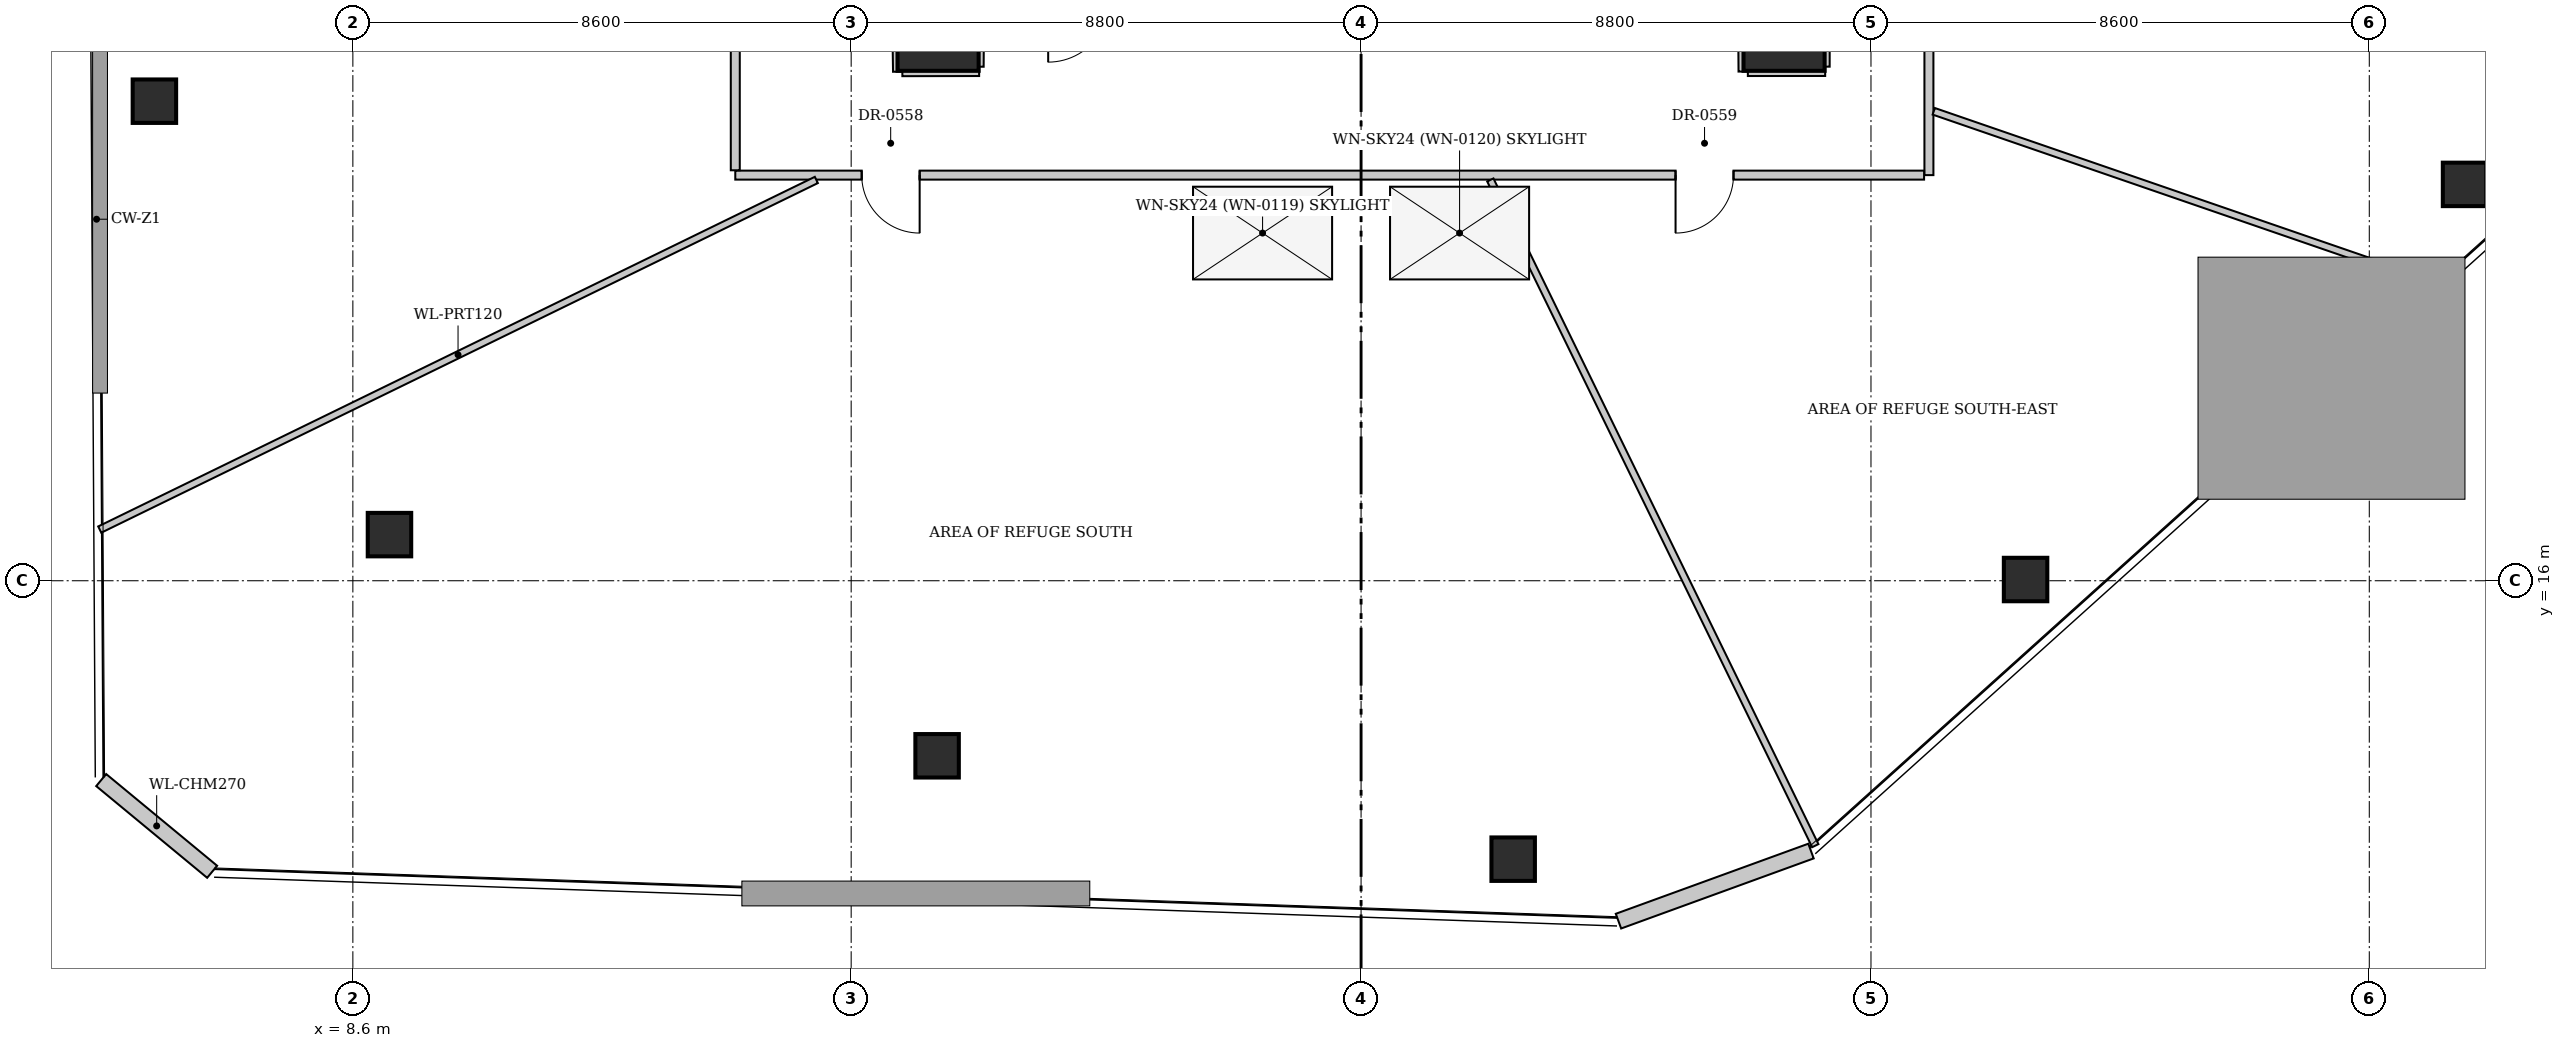
"""IFC4 building model, lengths in metres.
Left out: names, types, materials, properties, quantities, classifications, styles, units other than length and angle.
Written with IfcOpenShell. Run it as: python <this file> out.ifc"""

import sys

from ifc_helpers import new_model, si_unit, direction, frame, frame_2d, origin, origin_2d, place, context, subcontext, project, spatial, rectangle, hollow_rectangle, extrude, source, transform, mapped, element, fill, save


model = new_model("IFC4")
c1 = context("Model", 3, precision=1e-05, world=origin(), true_north=direction((0.0, 1.0)))
c2 = subcontext(c1, "Body", "Model", "MODEL_VIEW")
j1 = project(units=[si_unit("LENGTHUNIT", "METRE"), si_unit("PLANEANGLEUNIT", "RADIAN")], contexts=[c1])
p1 = place(None, origin())
s1 = spatial("IfcSite", under=j1, at=p1, CompositionType="ELEMENT")
p2 = place(p1, origin())
s2 = spatial("IfcBuilding", under=s1, at=p2, CompositionType="ELEMENT")
p3 = place(p2, frame((0.0, 0.0, 84.8)))
s3 = spatial("IfcBuildingStorey", under=s2, at=p3, CompositionType="ELEMENT", Elevation=84.8)
for number, where, z_axis, x_axis in (
    (1, (45.044, 22.84, 0.0), (0.0, 0.0, 1.0), (1.0, 0.0, 0.0)),
    (2, (37.468, 16.021, 0.0), (0.0, 0.0, 1.0), (1.0, 0.0, 0.0)),
    (3, (28.625, 11.195, 0.0), (0.0, 0.0, 1.0), (1.0, 0.0, 0.0)),
    (4, (18.683, 12.979, 0.0), (0.0, 0.0, 1.0), (1.0, 0.0, 0.0)),
    (5, (9.232, 16.796, 0.0), (0.0, 0.0, 1.0), (1.0, 0.0, 0.0)),
    (6, (5.175, 24.276, 0.0), (0.0, 0.0, 1.0), (1.0, 0.0, 0.0)),
):
    element("IfcColumn", number, at=place(p3, frame(where, z_axis=z_axis, x_axis=x_axis)), inside=s3, PredefinedType="COLUMN", context=c2, shape_type="SweptSolid", body=[
        extrude(hollow_rectangle(XDim=0.75, YDim=0.75, WallThickness=0.04, at=origin_2d()), origin(), (0.0, 0.0, 1.0), 4.15),
    ])
for number, where, z_axis, x_axis in (
    (7, (18.7, 25.5, 0.0), (0.0, 0.0, 1.0), (1.0, 0.0, 0.0)),
    (8, (33.3, 25.5, 0.0), (0.0, 0.0, 1.0), (1.0, 0.0, 0.0)),
):
    element("IfcColumn", number, at=place(p3, frame(where, z_axis=z_axis, x_axis=x_axis)), inside=s3, PredefinedType="COLUMN", context=c2, shape_type="SweptSolid", body=[
        extrude(rectangle(XDim=1.4, YDim=1.4, at=origin_2d()), origin(), (0.0, 0.0, 1.0), 4.15),
    ])
p4 = place(p3, frame((6.171, 10.978, 0.0), z_axis=(0.0, 0.0, 1.0), x_axis=(-0.770777069691, 0.637104943348, 0.0)))
e9 = element("IfcWall", 9, at=p4, inside=s3, PredefinedType="SOLIDWALL", context=c2, shape_type="SweptSolid", body=[
    extrude(rectangle(XDim=2.484, YDim=0.27, at=frame_2d((1.242, 0.0))), origin(), (0.0, 0.0, 1.0), 4.15),
])
p5 = place(p3, frame((33.765, 11.335, 0.0), z_axis=(0.0, 0.0, 1.0), x_axis=(-0.939676440204, -0.342064595839, 0.0)))
e10 = element("IfcWall", 10, at=p5, inside=s3, PredefinedType="SOLIDWALL", context=c2, shape_type="SweptSolid", body=[
    extrude(rectangle(XDim=3.536, YDim=0.27, at=frame_2d((1.768, 0.0))), origin(), (0.0, 0.0, 1.0), 4.15),
])
p6 = place(p3, frame((35.8, 41.267, 0.0), z_axis=(0.0, 0.0, 1.0), x_axis=(0.0, -1.0, 0.0)))
e11 = element("IfcWall", 11, at=p6, inside=s3, PredefinedType="PARTITIONING", context=c2, shape_type="SweptSolid", body=[
    extrude(rectangle(XDim=18.267, YDim=0.155, at=frame_2d((9.133, 0.0))), origin(), (0.0, 0.0, 1.0), 4.15),
])
p7 = place(p6, frame((12.56, 0.0, 0.0)))
e12 = element("IfcOpeningElement", 12, at=p7, cuts=e11, PredefinedType="OPENING", context=c2, shape_type="SweptSolid", body=[
    extrude(rectangle(XDim=1.0, YDim=2.15, at=frame_2d((0.5, 1.075))), frame((0.0, 0.087, 0.0), z_axis=(0.0, -1.0, 0.0), x_axis=(1.0, 0.0, 0.0)), (0.0, 0.0, 1.0), 0.175),
])
p8 = place(p6, frame((4.021, 0.0, 0.0)))
e13 = element("IfcOpeningElement", 13, at=p8, cuts=e11, PredefinedType="OPENING", context=c2, shape_type="SweptSolid", body=[
    extrude(rectangle(XDim=1.0, YDim=2.15, at=frame_2d((0.5, 1.075))), frame((0.0, 0.087, 0.0), z_axis=(0.0, -1.0, 0.0), x_axis=(1.0, 0.0, 0.0)), (0.0, 0.0, 1.0), 0.175),
])
p9 = place(p3, frame((35.717, 23.0, 0.0), z_axis=(0.0, 0.0, 1.0), x_axis=(-1.0, 0.0, 0.0)))
e14 = element("IfcWall", 14, at=p9, inside=s3, PredefinedType="PARTITIONING", context=c2, shape_type="SweptSolid", body=[
    extrude(rectangle(XDim=20.517, YDim=0.155, at=frame_2d((10.258, 0.0))), origin(), (0.0, 0.0, 1.0), 4.15),
])
p10 = place(p9, frame((17.335, 0.0, 0.0)))
e15 = element("IfcOpeningElement", 15, at=p10, cuts=e14, PredefinedType="OPENING", context=c2, shape_type="SweptSolid", body=[
    extrude(rectangle(XDim=1.0, YDim=2.15, at=frame_2d((0.5, 1.075))), frame((0.0, 0.087, 0.0), z_axis=(0.0, -1.0, 0.0), x_axis=(1.0, 0.0, 0.0)), (0.0, 0.0, 1.0), 0.175),
])
p11 = place(p9, frame((3.289, 0.0, 0.0)))
e16 = element("IfcOpeningElement", 16, at=p11, cuts=e14, PredefinedType="OPENING", context=c2, shape_type="SweptSolid", body=[
    extrude(rectangle(XDim=1.0, YDim=2.15, at=frame_2d((0.5, 1.075))), frame((0.0, 0.087, 0.0), z_axis=(0.0, -1.0, 0.0), x_axis=(1.0, 0.0, 0.0)), (0.0, 0.0, 1.0), 0.175),
])
p12 = place(p3, frame((15.2, 23.083, 0.0), z_axis=(0.0, 0.0, 1.0), x_axis=(0.0, 1.0, 0.0)))
e17 = element("IfcWall", 17, at=p12, inside=s3, PredefinedType="PARTITIONING", context=c2, shape_type="SweptSolid", body=[
    extrude(rectangle(XDim=18.183, YDim=0.155, at=frame_2d((9.092, 0.0))), origin(), (0.0, 0.0, 1.0), 4.15),
])
p13 = place(p12, frame((3.6, 0.0, 0.0)))
e18 = element("IfcOpeningElement", 18, at=p13, cuts=e17, PredefinedType="OPENING", context=c2, shape_type="SweptSolid", body=[
    extrude(rectangle(XDim=1.0, YDim=2.15, at=frame_2d((0.5, 1.075))), frame((0.0, 0.087, 0.0), z_axis=(0.0, -1.0, 0.0), x_axis=(1.0, 0.0, 0.0)), (0.0, 0.0, 1.0), 0.175),
])
p14 = place(p12, frame((12.631, 0.0, 0.0)))
e19 = element("IfcOpeningElement", 19, at=p14, cuts=e17, PredefinedType="OPENING", context=c2, shape_type="SweptSolid", body=[
    extrude(rectangle(XDim=1.0, YDim=2.15, at=frame_2d((0.5, 1.075))), frame((0.0, 0.087, 0.0), z_axis=(0.0, -1.0, 0.0), x_axis=(1.0, 0.0, 0.0)), (0.0, 0.0, 1.0), 0.175),
])
p15 = place(p3, frame((17.986, 25.717, 0.0), z_axis=(0.0, 0.0, 1.0), x_axis=(0.014935440835, -0.999888460083, 0.0)))
e20 = element("IfcWall", 20, at=p15, inside=s3, PredefinedType="PARTITIONING", context=c2, shape_type="SweptSolid", body=[
    extrude(rectangle(XDim=0.932, YDim=0.155, at=frame_2d((0.466, 0.0))), origin(), (0.0, 0.0, 1.0), 4.15),
])
p16 = place(p3, frame((18.083, 24.785, 0.0), z_axis=(0.0, 0.0, 1.0), x_axis=(0.99999830172, 0.001842975123, 0.0)))
e21 = element("IfcWall", 21, at=p16, inside=s3, PredefinedType="PARTITIONING", context=c2, shape_type="SweptSolid", body=[
    extrude(rectangle(XDim=1.325, YDim=0.155, at=frame_2d((0.662, 0.0))), origin(), (0.0, 0.0, 1.0), 4.15),
])
p17 = place(p3, frame((19.409, 24.871, 0.0), z_axis=(0.0, 0.0, 1.0), x_axis=(0.007106130977, 0.999974751133, 0.0)))
e22 = element("IfcWall", 22, at=p17, inside=s3, PredefinedType="PARTITIONING", context=c2, shape_type="SweptSolid", body=[
    extrude(rectangle(XDim=0.859, YDim=0.155, at=frame_2d((0.429, 0.0))), origin(), (0.0, 0.0, 1.0), 2.725),
])
p18 = place(p3, frame((32.585, 25.73, 0.0), z_axis=(0.0, 0.0, 1.0), x_axis=(0.007253695172, -0.999973691607, 0.0)))
e23 = element("IfcWall", 23, at=p18, inside=s3, PredefinedType="PARTITIONING", context=c2, shape_type="SweptSolid", body=[
    extrude(rectangle(XDim=0.942, YDim=0.155, at=frame_2d((0.471, 0.0))), origin(), (0.0, 0.0, 1.0), 2.725),
])
p19 = place(p3, frame((32.675, 24.788, 0.0), z_axis=(0.0, 0.0, 1.0), x_axis=(0.999999849328, 0.000548947767, 0.0)))
e24 = element("IfcWall", 24, at=p19, inside=s3, PredefinedType="PARTITIONING", context=c2, shape_type="SweptSolid", body=[
    extrude(rectangle(XDim=1.334, YDim=0.155, at=frame_2d((0.667, 0.0))), origin(), (0.0, 0.0, 1.0), 4.15),
])
p20 = place(p3, frame((34.01, 24.872, 0.0), z_axis=(0.0, 0.0, 1.0), x_axis=(0.001642633301, 0.999998650877, 0.0)))
e25 = element("IfcWall", 25, at=p20, inside=s3, PredefinedType="PARTITIONING", context=c2, shape_type="SweptSolid", body=[
    extrude(rectangle(XDim=1.338, YDim=0.155, at=frame_2d((0.669, 0.0))), origin(), (0.0, 0.0, 1.0), 2.725),
])
p21 = place(p3, frame((16.599, 22.917, 0.0), z_axis=(0.0, 0.0, 1.0), x_axis=(-0.898749176451, -0.438463131665, 0.0)))
e26 = element("IfcWall", 26, at=p21, inside=s3, PredefinedType="PARTITIONING", context=c2, shape_type="SweptSolid", body=[
    extrude(rectangle(XDim=13.76, YDim=0.12, at=frame_2d((6.88, 0.0))), origin(), (0.0, 0.0, 1.0), 2.725),
])
p22 = place(p3, frame((28.231, 22.917, 0.0), z_axis=(0.0, 0.0, 1.0), x_axis=(0.438691499882, -0.898637728972, 0.0)))
e27 = element("IfcWall", 27, at=p22, inside=s3, PredefinedType="PARTITIONING", context=c2, shape_type="SweptSolid", body=[
    extrude(rectangle(XDim=12.784, YDim=0.12, at=frame_2d((6.392, 0.0))), origin(), (0.0, 0.0, 1.0), 4.15),
])
p23 = place(p3, frame((35.884, 24.101, 0.0), z_axis=(0.0, 0.0, 1.0), x_axis=(0.945437205547, -0.325804374383, 0.0)))
e28 = element("IfcWall", 28, at=p23, inside=s3, PredefinedType="PARTITIONING", context=c2, shape_type="SweptSolid", body=[
    extrude(rectangle(XDim=9.208, YDim=0.12, at=frame_2d((4.604, 0.0))), origin(), (0.0, 0.0, 1.0), 4.15),
])
p24 = place(p3, frame((0.0, 0.0, -0.35)))
p25 = place(p24, frame((24.3, 22.0, 0.3)))
e29 = element("IfcWindow", 29, at=p25, inside=s3, PartitioningType="SINGLE_PANEL", PredefinedType="SKYLIGHT", context=c2, shape_type="SweptSolid", body=[
    extrude(rectangle(XDim=2.4, YDim=1.6, at=origin_2d()), origin(), (0.0, 0.0, 1.0), 0.05),
])
p26 = place(p24, frame((27.7, 22.0, 0.3)))
e30 = element("IfcWindow", 30, at=p26, inside=s3, PartitioningType="SINGLE_PANEL", PredefinedType="SKYLIGHT", context=c2, shape_type="SweptSolid", body=[
    extrude(rectangle(XDim=2.4, YDim=1.6, at=origin_2d()), origin(), (0.0, 0.0, 1.0), 0.05),
])
m1 = source(origin(), c2, "Body", "SweptSolid", [
    extrude(rectangle(XDim=1.0, YDim=2.15, at=frame_2d((0.5, 1.075))), frame((0.0, 0.025, 0.0), z_axis=(0.0, -1.0, 0.0), x_axis=(1.0, 0.0, 0.0)), (0.0, 0.0, 1.0), 0.05),
])
p27 = place(p10, origin())
e31 = element("IfcDoor", 31, at=p27, inside=s3, OperationType="SINGLE_SWING_LEFT", PredefinedType="DOOR", context=c2, shape_type="MappedRepresentation", body=[
    mapped(m1, transform((0.0, 0.0, 0.0), x_axis=(1.0, 0.0, 0.0), y_axis=(0.0, 1.0, 0.0), z_axis=(0.0, 0.0, 1.0), scale=1.0)),
])
fill(e15, e31)
p28 = place(p11, origin())
e32 = element("IfcDoor", 32, at=p28, inside=s3, OperationType="SINGLE_SWING_RIGHT", PredefinedType="DOOR", context=c2, shape_type="MappedRepresentation", body=[
    mapped(m1, transform((0.0, 0.0, 0.0), x_axis=(1.0, 0.0, 0.0), y_axis=(0.0, 1.0, 0.0), z_axis=(0.0, 0.0, 1.0), scale=1.0)),
])
fill(e16, e32)
save(model, sys.argv[1])
